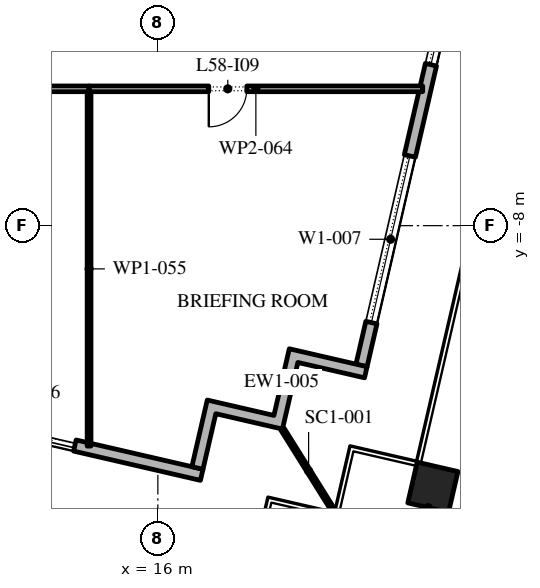
"""IFC4 building model, lengths in metres.
Left out: names, types, materials, properties, quantities, classifications, styles, units other than length and angle.
Written with IfcOpenShell. Run it as: python <this file> out.ifc"""

import sys

from ifc_helpers import new_model, si_unit, direction, frame, frame_2d, origin, origin_2d, place, context, subcontext, project, spatial, polyline, rectangle, outline, extrude, element, fill, save


model = new_model("IFC4")
c1 = context("Model", 3, precision=1e-05, world=origin(), true_north=direction((0.0, 1.0)))
c2 = subcontext(c1, "Body", "Model", "MODEL_VIEW")
j1 = project(units=[si_unit("LENGTHUNIT", "METRE"), si_unit("PLANEANGLEUNIT", "RADIAN")], contexts=[c1])
p1 = place(None, origin())
s1 = spatial("IfcSite", under=j1, at=p1, CompositionType="ELEMENT")
p2 = place(p1, origin())
s2 = spatial("IfcBuilding", under=s1, at=p2, CompositionType="ELEMENT")
p3 = place(p2, frame((0.0, 0.0, 268.2)))
s3 = spatial("IfcBuildingStorey", under=s2, at=p3, CompositionType="ELEMENT", Elevation=268.2)
p4 = place(p3, frame((23.236, -14.883, 0.0), z_axis=(0.0, 0.0, 1.0), x_axis=(0.974370064785, -0.224951054344, 0.0)))
e1 = element("IfcColumn", 1, at=p4, inside=s3, PredefinedType="COLUMN", context=c2, shape_type="SweptSolid", body=[
    extrude(rectangle(XDim=1.1, YDim=1.1, at=origin_2d()), origin(), (0.0, 0.0, 1.0), 4.2),
])
p5 = place(p3, frame((-29.616, -3.758, 0.0), z_axis=(0.0, 0.0, 1.0), x_axis=(0.974370532314, -0.224949029246, 0.0)))
e2 = element("IfcWall", 2, at=p5, inside=s3, PredefinedType="STANDARD", context=c2, shape_type="SweptSolid", body=[
    extrude(rectangle(XDim=48.0, YDim=0.3, at=frame_2d((24.0, 0.0))), origin(), (0.0, 0.0, 1.0), 4.0),
])
p6 = place(p5, frame((1.625, 0.0, 0.45)))
e3 = element("IfcOpeningElement", 3, at=p6, cuts=e2, PredefinedType="OPENING", context=c2, shape_type="SweptSolid", body=[
    extrude(rectangle(XDim=4.5, YDim=3.05, at=frame_2d((2.25, 1.525))), frame((0.0, 0.16, 0.0), z_axis=(0.0, -1.0, 0.0), x_axis=(1.0, 0.0, 0.0)), (0.0, 0.0, 1.0), 0.32),
])
p7 = place(p5, frame((10.575, 0.0, 0.0)))
e4 = element("IfcOpeningElement", 4, at=p7, cuts=e2, PredefinedType="OPENING", context=c2, shape_type="SweptSolid", body=[
    extrude(rectangle(XDim=2.4, YDim=3.5, at=frame_2d((1.2, 1.75))), frame((0.0, 0.16, 0.0), z_axis=(0.0, -1.0, 0.0), x_axis=(1.0, 0.0, 0.0)), (0.0, 0.0, 1.0), 0.32),
])
p8 = place(p5, frame((17.575, 0.0, 0.45)))
e5 = element("IfcOpeningElement", 5, at=p8, cuts=e2, PredefinedType="OPENING", context=c2, shape_type="SweptSolid", body=[
    extrude(rectangle(XDim=4.5, YDim=3.0, at=frame_2d((2.25, 1.5))), frame((0.0, 0.16, 0.0), z_axis=(0.0, -1.0, 0.0), x_axis=(1.0, 0.0, 0.0)), (0.0, 0.0, 1.0), 0.32),
])
p9 = place(p5, frame((25.625, 0.0, 0.45)))
e6 = element("IfcOpeningElement", 6, at=p9, cuts=e2, PredefinedType="OPENING", context=c2, shape_type="SweptSolid", body=[
    extrude(rectangle(XDim=4.5, YDim=2.95, at=frame_2d((2.25, 1.475))), frame((0.0, 0.16, 0.0), z_axis=(0.0, -1.0, 0.0), x_axis=(1.0, 0.0, 0.0)), (0.0, 0.0, 1.0), 0.32),
])
p10 = place(p5, frame((33.675, 0.0, 0.45)))
e7 = element("IfcOpeningElement", 7, at=p10, cuts=e2, PredefinedType="OPENING", context=c2, shape_type="SweptSolid", body=[
    extrude(rectangle(XDim=4.5, YDim=2.825, at=frame_2d((2.25, 1.413))), frame((0.0, 0.16, 0.0), z_axis=(0.0, -1.0, 0.0), x_axis=(1.0, 0.0, 0.0)), (0.0, 0.0, 1.0), 0.32),
])
p11 = place(p5, frame((42.175, 0.0, 0.0)))
e8 = element("IfcOpeningElement", 8, at=p11, cuts=e2, PredefinedType="OPENING", context=c2, shape_type="SweptSolid", body=[
    extrude(rectangle(XDim=2.4, YDim=3.5, at=frame_2d((1.2, 1.75))), frame((0.0, 0.16, 0.0), z_axis=(0.0, -1.0, 0.0), x_axis=(1.0, 0.0, 0.0)), (0.0, 0.0, 1.0), 0.32),
])
p12 = place(p3, frame((21.359, -11.678, 0.0), z_axis=(0.0, 0.0, 1.0), x_axis=(0.224949198343, 0.974370493275, 0.0)))
e9 = element("IfcWall", 9, at=p12, inside=s3, PredefinedType="STANDARD", context=c2, shape_type="SweptSolid", body=[
    extrude(rectangle(XDim=49.5, YDim=0.3, at=frame_2d((24.75, 0.0))), origin(), (0.0, 0.0, 1.0), 4.0),
])
p13 = place(p12, frame((1.157, 0.0, 0.45)))
e10 = element("IfcOpeningElement", 10, at=p13, cuts=e9, PredefinedType="OPENING", context=c2, shape_type="SweptSolid", body=[
    extrude(rectangle(XDim=4.5, YDim=3.05, at=frame_2d((2.25, 1.525))), frame((0.0, 0.16, 0.0), z_axis=(0.0, -1.0, 0.0), x_axis=(1.0, 0.0, 0.0)), (0.0, 0.0, 1.0), 0.32),
])
p14 = place(p12, frame((8.121, 0.0, 0.45)))
e11 = element("IfcOpeningElement", 11, at=p14, cuts=e9, PredefinedType="OPENING", context=c2, shape_type="SweptSolid", body=[
    extrude(rectangle(XDim=4.5, YDim=3.05, at=frame_2d((2.25, 1.525))), frame((0.0, 0.16, 0.0), z_axis=(0.0, -1.0, 0.0), x_axis=(1.0, 0.0, 0.0)), (0.0, 0.0, 1.0), 0.32),
])
p15 = place(p12, frame((15.236, 0.0, 0.45)))
e12 = element("IfcOpeningElement", 12, at=p15, cuts=e9, PredefinedType="OPENING", context=c2, shape_type="SweptSolid", body=[
    extrude(rectangle(XDim=4.5, YDim=3.05, at=frame_2d((2.25, 1.525))), frame((0.0, 0.16, 0.0), z_axis=(0.0, -1.0, 0.0), x_axis=(1.0, 0.0, 0.0)), (0.0, 0.0, 1.0), 0.32),
])
p16 = place(p12, frame((22.35, 0.0, 0.45)))
e13 = element("IfcOpeningElement", 13, at=p16, cuts=e9, PredefinedType="OPENING", context=c2, shape_type="SweptSolid", body=[
    extrude(rectangle(XDim=4.5, YDim=3.05, at=frame_2d((2.25, 1.525))), frame((0.0, 0.16, 0.0), z_axis=(0.0, -1.0, 0.0), x_axis=(1.0, 0.0, 0.0)), (0.0, 0.0, 1.0), 0.32),
])
p17 = place(p12, frame((29.464, 0.0, 0.45)))
e14 = element("IfcOpeningElement", 14, at=p17, cuts=e9, PredefinedType="OPENING", context=c2, shape_type="SweptSolid", body=[
    extrude(rectangle(XDim=4.5, YDim=2.95, at=frame_2d((2.25, 1.475))), frame((0.0, 0.16, 0.0), z_axis=(0.0, -1.0, 0.0), x_axis=(1.0, 0.0, 0.0)), (0.0, 0.0, 1.0), 0.32),
])
p18 = place(p12, frame((37.628, 0.0, 0.0)))
e15 = element("IfcOpeningElement", 15, at=p18, cuts=e9, PredefinedType="OPENING", context=c2, shape_type="SweptSolid", body=[
    extrude(rectangle(XDim=2.4, YDim=3.325, at=frame_2d((1.2, 1.663))), frame((0.0, 0.16, 0.0), z_axis=(0.0, -1.0, 0.0), x_axis=(1.0, 0.0, 0.0)), (0.0, 0.0, 1.0), 0.32),
])
p19 = place(p12, frame((43.693, 0.0, 0.45)))
e16 = element("IfcOpeningElement", 16, at=p19, cuts=e9, PredefinedType="OPENING", context=c2, shape_type="SweptSolid", body=[
    extrude(rectangle(XDim=4.5, YDim=3.05, at=frame_2d((2.25, 1.525))), frame((0.0, 0.16, 0.0), z_axis=(0.0, -1.0, 0.0), x_axis=(1.0, 0.0, 0.0)), (0.0, 0.0, 1.0), 0.32),
])
p20 = place(p3, origin())
e17 = element("IfcWall", 17, at=p20, inside=s3, PredefinedType="STANDARD", context=c2, shape_type="SweptSolid", body=[
    extrude(outline(polyline([(19.054, -12.993), (19.459, -11.24), (21.505, -11.712), (21.438, -12.004), (19.684, -11.599), (19.279, -13.353), (17.525, -12.948), (17.188, -14.41), (16.895, -14.342), (17.3, -12.588), (19.054, -12.993)])), origin(), (0.0, 0.0, 1.0), 4.0),
])
p21 = place(p3, frame((19.279, -13.353, -0.05), z_axis=(0.0, 0.0, 1.0), x_axis=(0.529914407191, -0.848051131154, 0.0)))
e18 = element("IfcWall", 18, at=p21, inside=s3, PredefinedType="STANDARD", context=c2, shape_type="SweptSolid", body=[
    extrude(rectangle(XDim=2.596, YDim=0.1, at=frame_2d((1.298, 0.0))), origin(), (0.0, 0.0, 1.0), 4.05),
])
p22 = place(p3, frame((14.19, -4.4, 0.0), z_axis=(0.0, 0.0, 1.0), x_axis=(-1.0, 0.0, 0.0)))
e19 = element("IfcWall", 19, at=p22, inside=s3, PredefinedType="PARTITIONING", context=c2, shape_type="SweptSolid", body=[
    extrude(rectangle(XDim=4.115, YDim=0.15, at=frame_2d((2.058, 0.0))), origin(), (0.0, 0.0, 1.0), 4.0),
])
p23 = place(p3, frame((14.19, -4.475, 0.0), z_axis=(0.0, 0.0, 1.0), x_axis=(0.0, -1.0, 0.0)))
e20 = element("IfcWall", 20, at=p23, inside=s3, PredefinedType="PARTITIONING", context=c2, shape_type="SweptSolid", body=[
    extrude(rectangle(XDim=9.325, YDim=0.1, at=frame_2d((4.663, 0.0))), origin(), (0.0, 0.0, 1.0), 4.0),
])
p24 = place(p3, frame((22.968, -4.4, 0.0), z_axis=(0.0, 0.0, 1.0), x_axis=(-1.0, 0.0, 0.0)))
e21 = element("IfcWall", 21, at=p24, inside=s3, PredefinedType="PARTITIONING", context=c2, shape_type="SweptSolid", body=[
    extrude(rectangle(XDim=8.778, YDim=0.15, at=frame_2d((4.389, 0.0))), origin(), (0.0, 0.0, 1.0), 4.0),
])
p25 = place(p24, frame((4.628, 0.0, 0.0)))
e22 = element("IfcOpeningElement", 22, at=p25, cuts=e21, PredefinedType="OPENING", context=c2, shape_type="SweptSolid", body=[
    extrude(rectangle(XDim=1.0, YDim=2.1, at=frame_2d((0.5, 1.05))), frame((0.0, 0.085, 0.0), z_axis=(0.0, -1.0, 0.0), x_axis=(1.0, 0.0, 0.0)), (0.0, 0.0, 1.0), 0.17),
])
p26 = place(p11, origin())
e23 = element("IfcDoor", 23, at=p26, inside=s3, OperationType="DOUBLE_DOOR_SLIDING", PredefinedType="DOOR", context=c2, shape_type="SweptSolid", body=[
    extrude(rectangle(XDim=2.4, YDim=3.5, at=frame_2d((1.2, 1.75))), frame((0.0, 0.025, 0.0), z_axis=(0.0, -1.0, 0.0), x_axis=(1.0, 0.0, 0.0)), (0.0, 0.0, 1.0), 0.05),
])
fill(e8, e23)
p27 = place(p13, origin())
e24 = element("IfcWindow", 24, at=p27, inside=s3, PartitioningType="DOUBLE_PANEL_VERTICAL", PredefinedType="WINDOW", context=c2, shape_type="SweptSolid", body=[
    extrude(rectangle(XDim=4.5, YDim=3.05, at=frame_2d((2.25, 1.525))), frame((0.0, 0.03, 0.0), z_axis=(0.0, -1.0, 0.0), x_axis=(1.0, 0.0, 0.0)), (0.0, 0.0, 1.0), 0.06),
])
fill(e10, e24)
p28 = place(p14, origin())
e25 = element("IfcWindow", 25, at=p28, inside=s3, PartitioningType="DOUBLE_PANEL_VERTICAL", PredefinedType="WINDOW", context=c2, shape_type="SweptSolid", body=[
    extrude(rectangle(XDim=4.5, YDim=3.05, at=frame_2d((2.25, 1.525))), frame((0.0, 0.03, 0.0), z_axis=(0.0, -1.0, 0.0), x_axis=(1.0, 0.0, 0.0)), (0.0, 0.0, 1.0), 0.06),
])
fill(e11, e25)
p29 = place(p25, origin())
e26 = element("IfcDoor", 26, at=p29, inside=s3, OperationType="SINGLE_SWING_LEFT", PredefinedType="DOOR", context=c2, shape_type="SweptSolid", body=[
    extrude(rectangle(XDim=1.0, YDim=2.1, at=frame_2d((0.5, 1.05))), frame((0.0, 0.025, 0.0), z_axis=(0.0, -1.0, 0.0), x_axis=(1.0, 0.0, 0.0)), (0.0, 0.0, 1.0), 0.05),
])
fill(e22, e26)
save(model, sys.argv[1])
